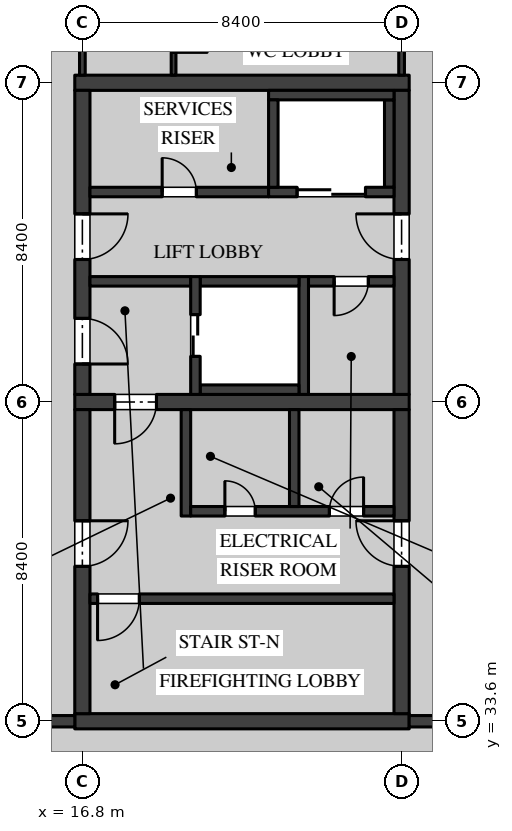
"""IFC4 building model, lengths in metres.
Left out: names, types, materials, properties, quantities, classifications, styles, units other than length and angle.
Written with IfcOpenShell. Run it as: python <this file> out.ifc"""

import sys

from ifc_helpers import new_model, si_unit, direction, frame, frame_2d, origin, place, context, subcontext, project, spatial, rectangle, extrude, element, fill, save


model = new_model("IFC4")
c1 = context("Model", 3, precision=1e-05, world=origin(), true_north=direction((0.0, 1.0)))
c2 = subcontext(c1, "Body", "Model", "MODEL_VIEW")
j1 = project(units=[si_unit("LENGTHUNIT", "METRE"), si_unit("PLANEANGLEUNIT", "RADIAN")], contexts=[c1])
p1 = place(None, origin())
s1 = spatial("IfcSite", under=j1, at=p1, CompositionType="ELEMENT")
p2 = place(p1, origin())
s2 = spatial("IfcBuilding", under=s1, at=p2, CompositionType="ELEMENT")
p3 = place(p2, frame((0.0, 0.0, 14.4)))
s3 = spatial("IfcBuildingStorey", under=s2, at=p3, CompositionType="ELEMENT", Elevation=14.4)
p4 = place(p3, frame((16.6, 42.0, 0.0), z_axis=(0.0, 0.0, 1.0), x_axis=(1.0, 0.0, 0.0)))
e1 = element("IfcWall", 1, at=p4, inside=s3, PredefinedType="SHEAR", context=c2, shape_type="SweptSolid", body=[
    extrude(rectangle(XDim=8.8, YDim=0.4, at=frame_2d((4.4, 0.0))), origin(), (0.0, 0.0, 1.0), 4.37),
])
p5 = place(p4, frame((1.05, 0.0, 0.0)))
e2 = element("IfcOpeningElement", 2, at=p5, cuts=e1, PredefinedType="OPENING", context=c2, shape_type="SweptSolid", body=[
    extrude(rectangle(XDim=1.1, YDim=2.1, at=frame_2d((0.55, 1.05))), frame((0.0, 0.21, 0.0), z_axis=(0.0, -1.0, 0.0), x_axis=(1.0, 0.0, 0.0)), (0.0, 0.0, 1.0), 0.42),
])
p6 = place(p3, frame((16.6, 50.4, 0.0), z_axis=(0.0, 0.0, 1.0), x_axis=(1.0, 0.0, 0.0)))
e3 = element("IfcWall", 3, at=p6, inside=s3, PredefinedType="SHEAR", context=c2, shape_type="SweptSolid", body=[
    extrude(rectangle(XDim=8.8, YDim=0.4, at=frame_2d((4.4, 0.0))), origin(), (0.0, 0.0, 1.0), 4.37),
])
p7 = place(p3, frame((16.8, 42.2, 0.0), z_axis=(0.0, 0.0, 1.0), x_axis=(0.0, 1.0, 0.0)))
e4 = element("IfcWall", 4, at=p7, inside=s3, PredefinedType="SHEAR", context=c2, shape_type="SweptSolid", body=[
    extrude(rectangle(XDim=8.0, YDim=0.4, at=frame_2d((4.0, 0.0))), origin(), (0.0, 0.0, 1.0), 4.37),
])
p8 = place(p7, frame((3.55, 0.0, 0.0)))
e5 = element("IfcOpeningElement", 5, at=p8, cuts=e4, PredefinedType="OPENING", context=c2, shape_type="SweptSolid", body=[
    extrude(rectangle(XDim=1.2, YDim=2.1, at=frame_2d((0.6, 1.05))), frame((0.0, 0.21, 0.0), z_axis=(0.0, -1.0, 0.0), x_axis=(1.0, 0.0, 0.0)), (0.0, 0.0, 1.0), 0.42),
])
p9 = place(p7, frame((0.8, 0.0, 0.0)))
e6 = element("IfcOpeningElement", 6, at=p9, cuts=e4, PredefinedType="OPENING", context=c2, shape_type="SweptSolid", body=[
    extrude(rectangle(XDim=1.2, YDim=2.1, at=frame_2d((0.6, 1.05))), frame((0.0, 0.21, 0.0), z_axis=(0.0, -1.0, 0.0), x_axis=(1.0, 0.0, 0.0)), (0.0, 0.0, 1.0), 0.42),
])
p10 = place(p3, frame((25.2, 42.2, 0.0), z_axis=(0.0, 0.0, 1.0), x_axis=(0.0, 1.0, 0.0)))
e7 = element("IfcWall", 7, at=p10, inside=s3, PredefinedType="SHEAR", context=c2, shape_type="SweptSolid", body=[
    extrude(rectangle(XDim=8.0, YDim=0.4, at=frame_2d((4.0, 0.0))), origin(), (0.0, 0.0, 1.0), 4.37),
])
p11 = place(p10, frame((3.55, 0.0, 0.0)))
e8 = element("IfcOpeningElement", 8, at=p11, cuts=e7, PredefinedType="OPENING", context=c2, shape_type="SweptSolid", body=[
    extrude(rectangle(XDim=1.2, YDim=2.1, at=frame_2d((0.6, 1.05))), frame((0.0, 0.21, 0.0), z_axis=(0.0, -1.0, 0.0), x_axis=(1.0, 0.0, 0.0)), (0.0, 0.0, 1.0), 0.42),
])
p12 = place(p3, frame((21.7, 47.525, 0.0), z_axis=(0.0, 0.0, 1.0), x_axis=(-1.0, 0.0, 0.0)))
e9 = element("IfcWall", 9, at=p12, inside=s3, PredefinedType="SOLIDWALL", context=c2, shape_type="SweptSolid", body=[
    extrude(rectangle(XDim=4.7, YDim=0.25, at=frame_2d((2.35, 0.0))), origin(), (0.0, 0.0, 1.0), 4.37),
])
p13 = place(p12, frame((1.9, 0.0, 0.0)))
e10 = element("IfcOpeningElement", 10, at=p13, cuts=e9, PredefinedType="OPENING", context=c2, shape_type="SweptSolid", body=[
    extrude(rectangle(XDim=0.9, YDim=2.1, at=frame_2d((0.45, 1.05))), frame((0.0, 0.135, 0.0), z_axis=(0.0, -1.0, 0.0), x_axis=(1.0, 0.0, 0.0)), (0.0, 0.0, 1.0), 0.27),
])
p14 = place(p3, frame((25.0, 45.175, 0.0), z_axis=(0.0, 0.0, 1.0), x_axis=(-1.0, 0.0, 0.0)))
e11 = element("IfcWall", 11, at=p14, inside=s3, PredefinedType="SOLIDWALL", context=c2, shape_type="SweptSolid", body=[
    extrude(rectangle(XDim=2.25, YDim=0.25, at=frame_2d((1.125, 0.0))), origin(), (0.0, 0.0, 1.0), 4.37),
])
p15 = place(p14, frame((0.675, 0.0, 0.0)))
e12 = element("IfcOpeningElement", 12, at=p15, cuts=e11, PredefinedType="OPENING", context=c2, shape_type="SweptSolid", body=[
    extrude(rectangle(XDim=0.9, YDim=2.1, at=frame_2d((0.45, 1.05))), frame((0.0, 0.135, 0.0), z_axis=(0.0, -1.0, 0.0), x_axis=(1.0, 0.0, 0.0)), (0.0, 0.0, 1.0), 0.27),
])
p16 = place(p3, frame((19.65, 45.175, 0.0), z_axis=(0.0, 0.0, 1.0), x_axis=(-1.0, 0.0, 0.0)))
e13 = element("IfcWall", 13, at=p16, inside=s3, PredefinedType="SOLIDWALL", context=c2, shape_type="SweptSolid", body=[
    extrude(rectangle(XDim=2.65, YDim=0.25, at=frame_2d((1.325, 0.0))), origin(), (0.0, 0.0, 1.0), 4.37),
])
p17 = place(p3, frame((16.6, 33.6, 0.0), z_axis=(0.0, 0.0, 1.0), x_axis=(1.0, 0.0, 0.0)))
e14 = element("IfcWall", 14, at=p17, inside=s3, PredefinedType="SHEAR", context=c2, shape_type="SweptSolid", body=[
    extrude(rectangle(XDim=8.8, YDim=0.4, at=frame_2d((4.4, 0.0))), origin(), (0.0, 0.0, 1.0), 4.37),
])
p18 = place(p3, frame((16.8, 33.8, 0.0), z_axis=(0.0, 0.0, 1.0), x_axis=(0.0, 1.0, 0.0)))
e15 = element("IfcWall", 15, at=p18, inside=s3, PredefinedType="SHEAR", context=c2, shape_type="SweptSolid", body=[
    extrude(rectangle(XDim=8.0, YDim=0.4, at=frame_2d((4.0, 0.0))), origin(), (0.0, 0.0, 1.0), 4.37),
])
p19 = place(p18, frame((3.875, 0.0, 0.0)))
e16 = element("IfcOpeningElement", 16, at=p19, cuts=e15, PredefinedType="OPENING", context=c2, shape_type="SweptSolid", body=[
    extrude(rectangle(XDim=1.2, YDim=2.1, at=frame_2d((0.6, 1.05))), frame((0.0, 0.21, 0.0), z_axis=(0.0, -1.0, 0.0), x_axis=(1.0, 0.0, 0.0)), (0.0, 0.0, 1.0), 0.42),
])
p20 = place(p3, frame((25.2, 33.8, 0.0), z_axis=(0.0, 0.0, 1.0), x_axis=(0.0, 1.0, 0.0)))
e17 = element("IfcWall", 17, at=p20, inside=s3, PredefinedType="SHEAR", context=c2, shape_type="SweptSolid", body=[
    extrude(rectangle(XDim=8.0, YDim=0.4, at=frame_2d((4.0, 0.0))), origin(), (0.0, 0.0, 1.0), 4.37),
])
p21 = place(p20, frame((3.875, 0.0, 0.0)))
e18 = element("IfcOpeningElement", 18, at=p21, cuts=e17, PredefinedType="OPENING", context=c2, shape_type="SweptSolid", body=[
    extrude(rectangle(XDim=1.2, YDim=2.1, at=frame_2d((0.6, 1.05))), frame((0.0, 0.21, 0.0), z_axis=(0.0, -1.0, 0.0), x_axis=(1.0, 0.0, 0.0)), (0.0, 0.0, 1.0), 0.42),
])
p22 = place(p3, frame((17.0, 36.825, 0.0), z_axis=(0.0, 0.0, 1.0), x_axis=(1.0, 0.0, 0.0)))
e19 = element("IfcWall", 19, at=p22, inside=s3, PredefinedType="SOLIDWALL", context=c2, shape_type="SweptSolid", body=[
    extrude(rectangle(XDim=8.0, YDim=0.25, at=frame_2d((4.0, 0.0))), origin(), (0.0, 0.0, 1.0), 4.37),
])
p23 = place(p22, frame((0.2, 0.0, 0.0)))
e20 = element("IfcOpeningElement", 20, at=p23, cuts=e19, PredefinedType="OPENING", context=c2, shape_type="SweptSolid", body=[
    extrude(rectangle(XDim=1.1, YDim=2.1, at=frame_2d((0.55, 1.05))), frame((0.0, 0.135, 0.0), z_axis=(0.0, -1.0, 0.0), x_axis=(1.0, 0.0, 0.0)), (0.0, 0.0, 1.0), 0.27),
])
p24 = place(p3, frame((19.525, 39.0, 0.0), z_axis=(0.0, 0.0, 1.0), x_axis=(0.0, 1.0, 0.0)))
e21 = element("IfcWall", 21, at=p24, inside=s3, PredefinedType="SOLIDWALL", context=c2, shape_type="SweptSolid", body=[
    extrude(rectangle(XDim=2.8, YDim=0.25, at=frame_2d((1.4, 0.0))), origin(), (0.0, 0.0, 1.0), 4.37),
])
p25 = place(p3, frame((19.65, 39.125, 0.0), z_axis=(0.0, 0.0, 1.0), x_axis=(1.0, 0.0, 0.0)))
e22 = element("IfcWall", 22, at=p25, inside=s3, PredefinedType="SOLIDWALL", context=c2, shape_type="SweptSolid", body=[
    extrude(rectangle(XDim=5.35, YDim=0.25, at=frame_2d((2.675, 0.0))), origin(), (0.0, 0.0, 1.0), 4.37),
])
p26 = place(p25, frame((3.65, 0.0, 0.0)))
e23 = element("IfcOpeningElement", 23, at=p26, cuts=e22, PredefinedType="OPENING", context=c2, shape_type="SweptSolid", body=[
    extrude(rectangle(XDim=0.9, YDim=2.1, at=frame_2d((0.45, 1.05))), frame((0.0, 0.135, 0.0), z_axis=(0.0, -1.0, 0.0), x_axis=(1.0, 0.0, 0.0)), (0.0, 0.0, 1.0), 0.27),
])
p27 = place(p25, frame((0.9, 0.0, 0.0)))
e24 = element("IfcOpeningElement", 24, at=p27, cuts=e22, PredefinedType="OPENING", context=c2, shape_type="SweptSolid", body=[
    extrude(rectangle(XDim=0.8, YDim=2.1, at=frame_2d((0.4, 1.05))), frame((0.0, 0.135, 0.0), z_axis=(0.0, -1.0, 0.0), x_axis=(1.0, 0.0, 0.0)), (0.0, 0.0, 1.0), 0.27),
])
p28 = place(p3, frame((22.375, 39.25, 0.0), z_axis=(0.0, 0.0, 1.0), x_axis=(0.0, 1.0, 0.0)))
e25 = element("IfcWall", 25, at=p28, inside=s3, PredefinedType="SOLIDWALL", context=c2, shape_type="SweptSolid", body=[
    extrude(rectangle(XDim=2.55, YDim=0.25, at=frame_2d((1.275, 0.0))), origin(), (0.0, 0.0, 1.0), 4.37),
])
p29 = place(p3, frame((24.875, 47.65, 0.0), z_axis=(0.0, 0.0, 1.0), x_axis=(0.0, 1.0, 0.0)))
e26 = element("IfcWall", 26, at=p29, inside=s3, PredefinedType="SOLIDWALL", context=c2, shape_type="SweptSolid", body=[
    extrude(rectangle(XDim=2.3, YDim=0.25, at=frame_2d((1.15, 0.0))), origin(), (0.0, 0.0, 1.0), 4.37),
])
p30 = place(p3, frame((21.7, 50.075, 0.0), z_axis=(0.0, 0.0, 1.0), x_axis=(1.0, 0.0, 0.0)))
e27 = element("IfcWall", 27, at=p30, inside=s3, PredefinedType="SOLIDWALL", context=c2, shape_type="SweptSolid", body=[
    extrude(rectangle(XDim=3.3, YDim=0.25, at=frame_2d((1.65, 0.0))), origin(), (0.0, 0.0, 1.0), 4.37),
])
p31 = place(p3, frame((21.7, 47.525, 0.0), z_axis=(0.0, 0.0, 1.0), x_axis=(1.0, 0.0, 0.0)))
e28 = element("IfcWall", 28, at=p31, inside=s3, PredefinedType="SOLIDWALL", context=c2, shape_type="SweptSolid", body=[
    extrude(rectangle(XDim=3.3, YDim=0.25, at=frame_2d((1.65, 0.0))), origin(), (0.0, 0.0, 1.0), 4.37),
])
p32 = place(p31, frame((0.75, 0.0, 0.0)))
e29 = element("IfcOpeningElement", 29, at=p32, cuts=e28, PredefinedType="OPENING", context=c2, shape_type="SweptSolid", body=[
    extrude(rectangle(XDim=1.8, YDim=2.1, at=frame_2d((0.9, 1.05))), frame((0.0, 0.135, 0.0), z_axis=(0.0, -1.0, 0.0), x_axis=(1.0, 0.0, 0.0)), (0.0, 0.0, 1.0), 0.27),
])
p33 = place(p3, frame((21.825, 47.65, 0.0), z_axis=(0.0, 0.0, 1.0), x_axis=(0.0, 1.0, 0.0)))
e30 = element("IfcWall", 30, at=p33, inside=s3, PredefinedType="SOLIDWALL", context=c2, shape_type="SweptSolid", body=[
    extrude(rectangle(XDim=2.3, YDim=0.25, at=frame_2d((1.15, 0.0))), origin(), (0.0, 0.0, 1.0), 4.37),
])
p34 = place(p3, frame((22.625, 42.2, 0.0), z_axis=(0.0, 0.0, 1.0), x_axis=(0.0, 1.0, 0.0)))
e31 = element("IfcWall", 31, at=p34, inside=s3, PredefinedType="SOLIDWALL", context=c2, shape_type="SweptSolid", body=[
    extrude(rectangle(XDim=3.1, YDim=0.25, at=frame_2d((1.55, 0.0))), origin(), (0.0, 0.0, 1.0), 4.37),
])
for number, where, z_axis, x_axis in (
    (32, (19.9, 45.175, 0.0), (0.0, 0.0, 1.0), (1.0, 0.0, 0.0)),
    (33, (19.9, 42.325, 0.0), (0.0, 0.0, 1.0), (1.0, 0.0, 0.0)),
):
    element("IfcWall", number, at=place(p3, frame(where, z_axis=z_axis, x_axis=x_axis)), inside=s3, PredefinedType="SOLIDWALL", context=c2, shape_type="SweptSolid", body=[
        extrude(rectangle(XDim=2.6, YDim=0.25, at=frame_2d((1.3, 0.0))), origin(), (0.0, 0.0, 1.0), 4.37),
    ])
p35 = place(p3, frame((19.775, 42.2, 0.0), z_axis=(0.0, 0.0, 1.0), x_axis=(0.0, 1.0, 0.0)))
e34 = element("IfcWall", 34, at=p35, inside=s3, PredefinedType="SOLIDWALL", context=c2, shape_type="SweptSolid", body=[
    extrude(rectangle(XDim=3.1, YDim=0.25, at=frame_2d((1.55, 0.0))), origin(), (0.0, 0.0, 1.0), 4.37),
])
p36 = place(p35, frame((1.0, 0.0, 0.0)))
e35 = element("IfcOpeningElement", 35, at=p36, cuts=e34, PredefinedType="OPENING", context=c2, shape_type="SweptSolid", body=[
    extrude(rectangle(XDim=1.1, YDim=2.1, at=frame_2d((0.55, 1.05))), frame((0.0, 0.135, 0.0), z_axis=(0.0, -1.0, 0.0), x_axis=(1.0, 0.0, 0.0)), (0.0, 0.0, 1.0), 0.27),
])
p37 = place(p3, frame((25.2, 50.6, 0.0), z_axis=(0.0, 0.0, 1.0), x_axis=(0.0, 1.0, 0.0)))
e36 = element("IfcWall", 36, at=p37, inside=s3, PredefinedType="PARTITIONING", context=c2, shape_type="SweptSolid", body=[
    extrude(rectangle(XDim=2.8, YDim=0.15, at=frame_2d((1.4, 0.0))), origin(), (0.0, 0.0, 1.0), 3.746),
])
p38 = place(p3, frame((16.8, 50.6, 0.0), z_axis=(0.0, 0.0, 1.0), x_axis=(0.0, 1.0, 0.0)))
e37 = element("IfcWall", 37, at=p38, inside=s3, PredefinedType="PARTITIONING", context=c2, shape_type="SweptSolid", body=[
    extrude(rectangle(XDim=8.0, YDim=0.15, at=frame_2d((4.0, 0.0))), origin(), (0.0, 0.0, 1.0), 3.746),
])
p39 = place(p38, frame((2.35, 0.0, 0.0)))
e38 = element("IfcOpeningElement", 38, at=p39, cuts=e37, PredefinedType="OPENING", context=c2, shape_type="SweptSolid", body=[
    extrude(rectangle(XDim=0.9, YDim=2.1, at=frame_2d((0.45, 1.05))), frame((0.0, 0.085, 0.0), z_axis=(0.0, -1.0, 0.0), x_axis=(1.0, 0.0, 0.0)), (0.0, 0.0, 1.0), 0.17),
])
p40 = place(p3, frame((19.2, 50.6, 0.0), z_axis=(0.0, 0.0, 1.0), x_axis=(0.0, 1.0, 0.0)))
e39 = element("IfcWall", 39, at=p40, inside=s3, PredefinedType="PARTITIONING", context=c2, shape_type="SweptSolid", body=[
    extrude(rectangle(XDim=2.8, YDim=0.125, at=frame_2d((1.4, 0.0))), origin(), (0.0, 0.0, 1.0), 4.37),
])
p41 = place(p40, frame((0.6, 0.0, 0.0)))
e40 = element("IfcOpeningElement", 40, at=p41, cuts=e39, PredefinedType="OPENING", context=c2, shape_type="SweptSolid", body=[
    extrude(rectangle(XDim=0.9, YDim=2.1, at=frame_2d((0.45, 1.05))), frame((0.0, 0.073, 0.0), z_axis=(0.0, -1.0, 0.0), x_axis=(1.0, 0.0, 0.0)), (0.0, 0.0, 1.0), 0.145),
])
p42 = place(p3, frame((33.597, 33.6, 0.0), z_axis=(0.0, 0.0, 1.0), x_axis=(-1.0, 0.0, 0.0)))
e41 = element("IfcWall", 41, at=p42, inside=s3, PredefinedType="SOLIDWALL", context=c2, shape_type="SweptSolid", body=[
    extrude(rectangle(XDim=8.197, YDim=0.3, at=frame_2d((4.098, 0.0))), origin(), (0.0, 0.0, 1.0), 3.746),
])
p43 = place(p3, frame((16.6, 33.6, 0.0), z_axis=(0.0, 0.0, 1.0), x_axis=(-1.0, 0.0, 0.0)))
e42 = element("IfcWall", 42, at=p43, inside=s3, PredefinedType="SOLIDWALL", context=c2, shape_type="SweptSolid", body=[
    extrude(rectangle(XDim=8.195, YDim=0.3, at=frame_2d((4.098, 0.0))), origin(), (0.0, 0.0, 1.0), 3.746),
])
p44 = place(p8, frame((1.2, 0.0, 0.0), z_axis=(0.0, 0.0, 1.0), x_axis=(-1.0, 0.0, 0.0)))
e43 = element("IfcDoor", 43, at=p44, inside=s3, OperationType="SINGLE_SWING_RIGHT", PredefinedType="DOOR", context=c2, shape_type="SweptSolid", body=[
    extrude(rectangle(XDim=1.2, YDim=2.1, at=frame_2d((0.6, 1.05))), frame((0.0, 0.035, 0.0), z_axis=(0.0, -1.0, 0.0), x_axis=(1.0, 0.0, 0.0)), (0.0, 0.0, 1.0), 0.07),
])
fill(e5, e43)
p45 = place(p11, origin())
e44 = element("IfcDoor", 44, at=p45, inside=s3, OperationType="SINGLE_SWING_LEFT", PredefinedType="DOOR", context=c2, shape_type="SweptSolid", body=[
    extrude(rectangle(XDim=1.2, YDim=2.1, at=frame_2d((0.6, 1.05))), frame((0.0, 0.035, 0.0), z_axis=(0.0, -1.0, 0.0), x_axis=(1.0, 0.0, 0.0)), (0.0, 0.0, 1.0), 0.07),
])
fill(e8, e44)
p46 = place(p9, frame((1.2, 0.0, 0.0), z_axis=(0.0, 0.0, 1.0), x_axis=(-1.0, 0.0, 0.0)))
e45 = element("IfcDoor", 45, at=p46, inside=s3, OperationType="SINGLE_SWING_LEFT", PredefinedType="DOOR", context=c2, shape_type="SweptSolid", body=[
    extrude(rectangle(XDim=1.2, YDim=2.1, at=frame_2d((0.6, 1.05))), frame((0.0, 0.035, 0.0), z_axis=(0.0, -1.0, 0.0), x_axis=(1.0, 0.0, 0.0)), (0.0, 0.0, 1.0), 0.07),
])
fill(e6, e45)
p47 = place(p5, frame((1.1, 0.0, 0.0), z_axis=(0.0, 0.0, 1.0), x_axis=(-1.0, 0.0, 0.0)))
e46 = element("IfcDoor", 46, at=p47, inside=s3, OperationType="SINGLE_SWING_LEFT", PredefinedType="DOOR", context=c2, shape_type="SweptSolid", body=[
    extrude(rectangle(XDim=1.1, YDim=2.1, at=frame_2d((0.55, 1.05))), frame((0.0, 0.035, 0.0), z_axis=(0.0, -1.0, 0.0), x_axis=(1.0, 0.0, 0.0)), (0.0, 0.0, 1.0), 0.07),
])
fill(e2, e46)
p48 = place(p13, frame((0.9, 0.0, 0.0), z_axis=(0.0, 0.0, 1.0), x_axis=(-1.0, 0.0, 0.0)))
e47 = element("IfcDoor", 47, at=p48, inside=s3, OperationType="SINGLE_SWING_RIGHT", PredefinedType="DOOR", context=c2, shape_type="SweptSolid", body=[
    extrude(rectangle(XDim=0.9, YDim=2.1, at=frame_2d((0.45, 1.05))), frame((0.0, 0.035, 0.0), z_axis=(0.0, -1.0, 0.0), x_axis=(1.0, 0.0, 0.0)), (0.0, 0.0, 1.0), 0.07),
])
fill(e10, e47)
p49 = place(p15, origin())
e48 = element("IfcDoor", 48, at=p49, inside=s3, OperationType="SINGLE_SWING_LEFT", PredefinedType="DOOR", context=c2, shape_type="SweptSolid", body=[
    extrude(rectangle(XDim=0.9, YDim=2.1, at=frame_2d((0.45, 1.05))), frame((0.0, 0.05, 0.0), z_axis=(0.0, -1.0, 0.0), x_axis=(1.0, 0.0, 0.0)), (0.0, 0.0, 1.0), 0.1),
])
fill(e12, e48)
p50 = place(p26, origin())
e49 = element("IfcDoor", 49, at=p50, inside=s3, OperationType="SINGLE_SWING_LEFT", PredefinedType="DOOR", context=c2, shape_type="SweptSolid", body=[
    extrude(rectangle(XDim=0.9, YDim=2.1, at=frame_2d((0.45, 1.05))), frame((0.0, 0.035, 0.0), z_axis=(0.0, -1.0, 0.0), x_axis=(1.0, 0.0, 0.0)), (0.0, 0.0, 1.0), 0.07),
])
fill(e23, e49)
p51 = place(p19, frame((1.2, 0.0, 0.0), z_axis=(0.0, 0.0, 1.0), x_axis=(-1.0, 0.0, 0.0)))
e50 = element("IfcDoor", 50, at=p51, inside=s3, OperationType="SINGLE_SWING_RIGHT", PredefinedType="DOOR", context=c2, shape_type="SweptSolid", body=[
    extrude(rectangle(XDim=1.2, YDim=2.1, at=frame_2d((0.6, 1.05))), frame((0.0, 0.035, 0.0), z_axis=(0.0, -1.0, 0.0), x_axis=(1.0, 0.0, 0.0)), (0.0, 0.0, 1.0), 0.07),
])
fill(e16, e50)
p52 = place(p21, origin())
e51 = element("IfcDoor", 51, at=p52, inside=s3, OperationType="SINGLE_SWING_LEFT", PredefinedType="DOOR", context=c2, shape_type="SweptSolid", body=[
    extrude(rectangle(XDim=1.2, YDim=2.1, at=frame_2d((0.6, 1.05))), frame((0.0, 0.035, 0.0), z_axis=(0.0, -1.0, 0.0), x_axis=(1.0, 0.0, 0.0)), (0.0, 0.0, 1.0), 0.07),
])
fill(e18, e51)
p53 = place(p27, origin())
e52 = element("IfcDoor", 52, at=p53, inside=s3, OperationType="SINGLE_SWING_RIGHT", PredefinedType="DOOR", context=c2, shape_type="SweptSolid", body=[
    extrude(rectangle(XDim=0.8, YDim=2.1, at=frame_2d((0.4, 1.05))), frame((0.0, 0.035, 0.0), z_axis=(0.0, -1.0, 0.0), x_axis=(1.0, 0.0, 0.0)), (0.0, 0.0, 1.0), 0.07),
])
fill(e24, e52)
p54 = place(p23, frame((1.1, 0.0, 0.0), z_axis=(0.0, 0.0, 1.0), x_axis=(-1.0, 0.0, 0.0)))
e53 = element("IfcDoor", 53, at=p54, inside=s3, OperationType="SINGLE_SWING_LEFT", PredefinedType="DOOR", context=c2, shape_type="SweptSolid", body=[
    extrude(rectangle(XDim=1.1, YDim=2.1, at=frame_2d((0.55, 1.05))), frame((0.0, 0.035, 0.0), z_axis=(0.0, -1.0, 0.0), x_axis=(1.0, 0.0, 0.0)), (0.0, 0.0, 1.0), 0.07),
])
fill(e20, e53)
p55 = place(p32, origin())
e54 = element("IfcDoor", 54, at=p55, inside=s3, OperationType="DOUBLE_DOOR_SLIDING", PredefinedType="DOOR", context=c2, shape_type="SweptSolid", body=[
    extrude(rectangle(XDim=1.8, YDim=2.1, at=frame_2d((0.9, 1.05))), frame((0.0, 0.04, 0.0), z_axis=(0.0, -1.0, 0.0), x_axis=(1.0, 0.0, 0.0)), (0.0, 0.0, 1.0), 0.08),
])
fill(e29, e54)
p56 = place(p36, origin())
e55 = element("IfcDoor", 55, at=p56, inside=s3, OperationType="DOUBLE_DOOR_SLIDING", PredefinedType="DOOR", context=c2, shape_type="SweptSolid", body=[
    extrude(rectangle(XDim=1.1, YDim=2.1, at=frame_2d((0.55, 1.05))), frame((0.0, 0.04, 0.0), z_axis=(0.0, -1.0, 0.0), x_axis=(1.0, 0.0, 0.0)), (0.0, 0.0, 1.0), 0.08),
])
fill(e35, e55)
save(model, sys.argv[1])
